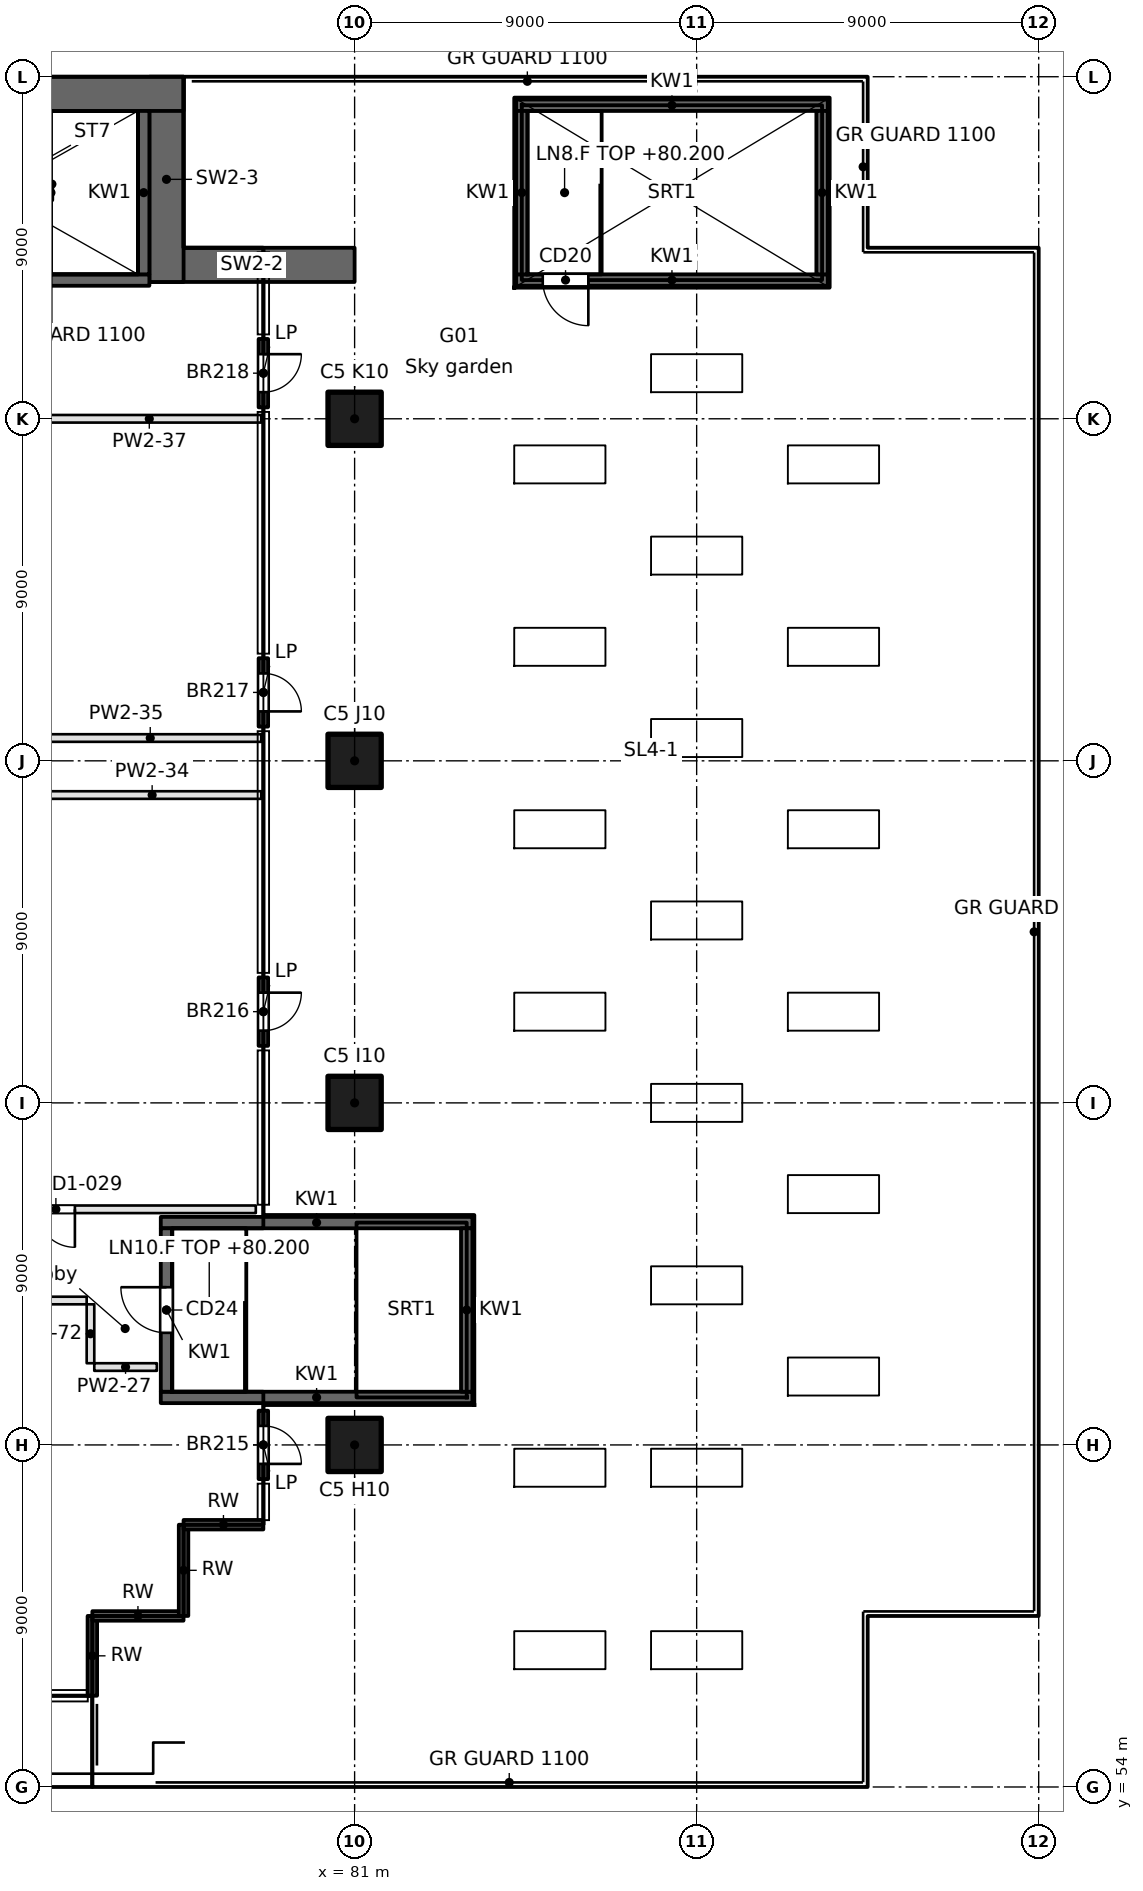
"""IFC4 building model, lengths in metres.
Left out: names, types, materials, properties, quantities, classifications, styles, units other than length and angle.
Written with IfcOpenShell. Run it as: python <this file> out.ifc"""

import sys

from ifc_helpers import new_model, si_unit, direction, frame, frame_2d, origin, origin_2d, place, context, subcontext, project, spatial, rectangle, extrude, element, fill, save


model = new_model("IFC4")
c1 = context("Model", 3, precision=1e-05, world=origin(), true_north=direction((0.0, 1.0)))
c2 = subcontext(c1, "Body", "Model", "MODEL_VIEW")
j1 = project(units=[si_unit("LENGTHUNIT", "METRE"), si_unit("PLANEANGLEUNIT", "RADIAN")], contexts=[c1])
p1 = place(None, origin())
s1 = spatial("IfcSite", under=j1, at=p1, CompositionType="ELEMENT")
p2 = place(p1, origin())
s2 = spatial("IfcBuilding", under=s1, at=p2, CompositionType="ELEMENT")
p3 = place(p2, frame((0.0, 0.0, 80.2)))
s3 = spatial("IfcBuildingStorey", under=s2, at=p3, CompositionType="ELEMENT", Elevation=80.2)
for number, where, z_axis, x_axis in (
    (1, (81.0, 63.0, 0.0), (0.0, 0.0, 1.0), (1.0, 0.0, 0.0)),
    (2, (81.0, 72.0, 0.0), (0.0, 0.0, 1.0), (1.0, 0.0, 0.0)),
    (3, (81.0, 81.0, 0.0), (0.0, 0.0, 1.0), (1.0, 0.0, 0.0)),
    (4, (81.0, 90.0, 0.0), (0.0, 0.0, 1.0), (1.0, 0.0, 0.0)),
):
    element("IfcColumn", number, at=place(p3, frame(where, z_axis=z_axis, x_axis=x_axis)), inside=s3, PredefinedType="COLUMN", context=c2, shape_type="SweptSolid", body=[
        extrude(rectangle(XDim=1.4, YDim=1.4, at=origin_2d()), origin(), (0.0, 0.0, 1.0), 4.6),
    ])
p4 = place(p3, frame((81.0, 94.05, 0.0), z_axis=(0.0, 0.0, 1.0), x_axis=(-1.0, 0.0, 0.0)))
e5 = element("IfcWall", 5, at=p4, inside=s3, PredefinedType="SHEAR", context=c2, shape_type="SweptSolid", body=[
    extrude(rectangle(XDim=5.4, YDim=0.9, at=frame_2d((2.7, 0.0))), origin(), (0.0, 0.0, 1.0), 4.6),
])
p5 = place(p3, frame((76.05, 93.6, 0.0), z_axis=(0.0, 0.0, 1.0), x_axis=(0.0, 1.0, 0.0)))
e6 = element("IfcWall", 6, at=p5, inside=s3, PredefinedType="SHEAR", context=c2, shape_type="SweptSolid", body=[
    extrude(rectangle(XDim=5.4, YDim=0.9, at=frame_2d((2.7, 0.0))), origin(), (0.0, 0.0, 1.0), 4.6),
])
p6 = place(p3, frame((76.5, 98.55, 0.0), z_axis=(0.0, 0.0, 1.0), x_axis=(-1.0, 0.0, 0.0)))
e7 = element("IfcWall", 7, at=p6, inside=s3, PredefinedType="SHEAR", context=c2, shape_type="SweptSolid", body=[
    extrude(rectangle(XDim=72.0, YDim=0.9, at=frame_2d((36.0, 0.0))), origin(), (0.0, 0.0, 1.0), 4.6),
])
p7 = place(p3, frame((74.099, 56.401, 0.0), z_axis=(0.0, 0.0, 1.0), x_axis=(0.00011626555, 0.999999993241, 0.0)))
e8 = element("IfcWall", 8, at=p7, inside=s3, PredefinedType="SOLIDWALL", context=c2, shape_type="SweptSolid", body=[
    extrude(rectangle(XDim=2.1, YDim=0.25, at=frame_2d((1.05, 0.0))), origin(), (0.0, 0.0, 1.0), 4.2),
])
for number, where, z_axis, x_axis in (
    (9, (74.099, 58.501, 0.0), (0.0, 0.0, 1.0), (1.0, 0.0, 0.0)),
    (10, (76.499, 58.501, 0.0), (0.0, 0.0, 1.0), (0.0, 1.0, 0.0)),
):
    element("IfcWall", number, at=place(p3, frame(where, z_axis=z_axis, x_axis=x_axis)), inside=s3, PredefinedType="SOLIDWALL", context=c2, shape_type="SweptSolid", body=[
        extrude(rectangle(XDim=2.4, YDim=0.25, at=frame_2d((1.2, 0.0))), origin(), (0.0, 0.0, 1.0), 4.2),
    ])
p8 = place(p3, frame((76.499, 60.901, 0.0), z_axis=(0.0, 0.0, 1.0), x_axis=(0.999999993241, 0.00011626555, 0.0)))
e11 = element("IfcWall", 11, at=p8, inside=s3, PredefinedType="SOLIDWALL", context=c2, shape_type="SweptSolid", body=[
    extrude(rectangle(XDim=2.1, YDim=0.25, at=frame_2d((1.05, 0.0))), origin(), (0.0, 0.0, 1.0), 4.2),
])
p9 = place(p3, frame((78.599, 62.101, 0.0), z_axis=(0.0, 0.0, 1.0), x_axis=(0.0, 1.0, 0.0)))
e12 = element("IfcWall", 12, at=p9, inside=s3, PredefinedType="SOLIDWALL", context=c2, shape_type="SweptSolid", body=[
    extrude(rectangle(XDim=1.8, YDim=0.25, at=frame_2d((0.9, 0.0))), origin(), (0.0, 0.0, 1.0), 4.2),
])
p10 = place(p9, frame((0.4, 0.0, 0.0)))
e13 = element("IfcOpeningElement", 13, at=p10, cuts=e12, PredefinedType="OPENING", context=c2, shape_type="SweptSolid", body=[
    extrude(rectangle(XDim=1.0, YDim=2.1, at=frame_2d((0.5, 1.05))), frame((0.0, 0.125, 0.0), z_axis=(0.0, -1.0, 0.0), x_axis=(1.0, 0.0, 0.0)), (0.0, 0.0, 1.0), 0.25),
])
p11 = place(p3, frame((78.599, 73.501, 0.0), z_axis=(0.0, 0.0, 1.0), x_axis=(0.0, 1.0, 0.0)))
e14 = element("IfcWall", 14, at=p11, inside=s3, PredefinedType="SOLIDWALL", context=c2, shape_type="SweptSolid", body=[
    extrude(rectangle(XDim=1.8, YDim=0.25, at=frame_2d((0.9, 0.0))), origin(), (0.0, 0.0, 1.0), 4.2),
])
p12 = place(p11, frame((0.4, 0.0, 0.0)))
e15 = element("IfcOpeningElement", 15, at=p12, cuts=e14, PredefinedType="OPENING", context=c2, shape_type="SweptSolid", body=[
    extrude(rectangle(XDim=1.0, YDim=2.1, at=frame_2d((0.5, 1.05))), frame((0.0, 0.125, 0.0), z_axis=(0.0, -1.0, 0.0), x_axis=(1.0, 0.0, 0.0)), (0.0, 0.0, 1.0), 0.25),
])
p13 = place(p3, frame((78.599, 81.9, 0.0), z_axis=(0.0, 0.0, 1.0), x_axis=(0.0, 1.0, 0.0)))
e16 = element("IfcWall", 16, at=p13, inside=s3, PredefinedType="SOLIDWALL", context=c2, shape_type="SweptSolid", body=[
    extrude(rectangle(XDim=1.8, YDim=0.25, at=frame_2d((0.9, 0.0))), origin(), (0.0, 0.0, 1.0), 4.2),
])
p14 = place(p13, frame((0.4, 0.0, 0.0)))
e17 = element("IfcOpeningElement", 17, at=p14, cuts=e16, PredefinedType="OPENING", context=c2, shape_type="SweptSolid", body=[
    extrude(rectangle(XDim=1.0, YDim=2.1, at=frame_2d((0.5, 1.05))), frame((0.0, 0.125, 0.0), z_axis=(0.0, -1.0, 0.0), x_axis=(1.0, 0.0, 0.0)), (0.0, 0.0, 1.0), 0.25),
])
p15 = place(p3, frame((78.599, 90.3, 0.0), z_axis=(0.0, 0.0, 1.0), x_axis=(0.0, 1.0, 0.0)))
e18 = element("IfcWall", 18, at=p15, inside=s3, PredefinedType="SOLIDWALL", context=c2, shape_type="SweptSolid", body=[
    extrude(rectangle(XDim=1.8, YDim=0.25, at=frame_2d((0.9, 0.0))), origin(), (0.0, 0.0, 1.0), 4.2),
])
p16 = place(p15, frame((0.4, 0.0, 0.0)))
e19 = element("IfcOpeningElement", 19, at=p16, cuts=e18, PredefinedType="OPENING", context=c2, shape_type="SweptSolid", body=[
    extrude(rectangle(XDim=1.0, YDim=2.1, at=frame_2d((0.5, 1.05))), frame((0.0, 0.125, 0.0), z_axis=(0.0, -1.0, 0.0), x_axis=(1.0, 0.0, 0.0)), (0.0, 0.0, 1.0), 0.25),
])
for number, where, z_axis, x_axis in (
    (20, (75.9, 64.25, -0.45), (0.0, 0.0, 1.0), (1.0, 0.0, 0.0)),
    (21, (75.9, 68.85, -0.45), (0.0, 0.0, 1.0), (1.0, 0.0, 0.0)),
):
    element("IfcWall", number, at=place(p3, frame(where, z_axis=z_axis, x_axis=x_axis)), inside=s3, PredefinedType="SOLIDWALL", context=c2, shape_type="SweptSolid", body=[
        extrude(rectangle(XDim=8.2, YDim=0.3, at=frame_2d((4.1, 0.0))), origin(), (0.0, 0.0, 1.0), 4.65),
    ])
p17 = place(p3, frame((67.4, 93.65, -0.45), z_axis=(0.0, 0.0, 1.0), x_axis=(1.0, 0.0, 0.0)))
e22 = element("IfcWall", 22, at=p17, inside=s3, PredefinedType="SOLIDWALL", context=c2, shape_type="SweptSolid", body=[
    extrude(rectangle(XDim=8.2, YDim=0.3, at=frame_2d((4.1, 0.0))), origin(), (0.0, 0.0, 1.0), 4.65),
])
p18 = place(p17, frame((0.7, 0.0, 0.45)))
e23 = element("IfcOpeningElement", 23, at=p18, cuts=e22, PredefinedType="OPENING", context=c2, shape_type="SweptSolid", body=[
    extrude(rectangle(XDim=1.2, YDim=2.1, at=frame_2d((0.6, 1.05))), frame((0.0, 0.15, 0.0), z_axis=(0.0, -1.0, 0.0), x_axis=(1.0, 0.0, 0.0)), (0.0, 0.0, 1.0), 0.3),
])
p19 = place(p3, frame((85.25, 93.65, -0.45), z_axis=(0.0, 0.0, 1.0), x_axis=(1.0, 0.0, 0.0)))
e24 = element("IfcWall", 24, at=p19, inside=s3, PredefinedType="SOLIDWALL", context=c2, shape_type="SweptSolid", body=[
    extrude(rectangle(XDim=8.2, YDim=0.3, at=frame_2d((4.1, 0.0))), origin(), (0.0, 0.0, 1.0), 4.65),
])
p20 = place(p19, frame((0.7, 0.0, 0.45)))
e25 = element("IfcOpeningElement", 25, at=p20, cuts=e24, PredefinedType="OPENING", context=c2, shape_type="SweptSolid", body=[
    extrude(rectangle(XDim=1.2, YDim=2.1, at=frame_2d((0.6, 1.05))), frame((0.0, 0.15, 0.0), z_axis=(0.0, -1.0, 0.0), x_axis=(1.0, 0.0, 0.0)), (0.0, 0.0, 1.0), 0.3),
])
p21 = place(p3, frame((85.25, 98.25, 0.0), z_axis=(0.0, 0.0, 1.0), x_axis=(1.0, 0.0, 0.0)))
e26 = element("IfcWall", 26, at=p21, inside=s3, PredefinedType="SOLIDWALL", context=c2, shape_type="SweptSolid", body=[
    extrude(rectangle(XDim=8.2, YDim=0.3, at=frame_2d((4.1, 0.0))), origin(), (0.0, 0.0, 1.0), 4.2),
])
p22 = place(p3, frame((75.45, 93.8, -0.45), z_axis=(0.0, 0.0, 1.0), x_axis=(0.0, 1.0, 0.0)))
e27 = element("IfcWall", 27, at=p22, inside=s3, PredefinedType="SOLIDWALL", context=c2, shape_type="SweptSolid", body=[
    extrude(rectangle(XDim=4.3, YDim=0.3, at=frame_2d((2.15, 0.0))), origin(), (0.0, 0.0, 1.0), 4.65),
])
p23 = place(p3, frame((76.05, 64.4, -0.45), z_axis=(0.0, 0.0, 1.0), x_axis=(0.0, 1.0, 0.0)))
e28 = element("IfcWall", 28, at=p23, inside=s3, PredefinedType="SOLIDWALL", context=c2, shape_type="SweptSolid", body=[
    extrude(rectangle(XDim=4.3, YDim=0.3, at=frame_2d((2.15, 0.0))), origin(), (0.0, 0.0, 1.0), 4.65),
])
p24 = place(p23, frame((1.55, 0.0, 0.45)))
e29 = element("IfcOpeningElement", 29, at=p24, cuts=e28, PredefinedType="OPENING", context=c2, shape_type="SweptSolid", body=[
    extrude(rectangle(XDim=1.2, YDim=2.1, at=frame_2d((0.6, 1.05))), frame((0.0, 0.15, 0.0), z_axis=(0.0, -1.0, 0.0), x_axis=(1.0, 0.0, 0.0)), (0.0, 0.0, 1.0), 0.3),
])
for number, where, z_axis, x_axis in (
    (30, (83.95, 64.4, -0.45), (0.0, 0.0, 1.0), (0.0, 1.0, 0.0)),
    (31, (85.4, 93.8, -0.45), (0.0, 0.0, 1.0), (0.0, 1.0, 0.0)),
    (32, (93.3, 93.8, -0.45), (0.0, 0.0, 1.0), (0.0, 1.0, 0.0)),
):
    element("IfcWall", number, at=place(p3, frame(where, z_axis=z_axis, x_axis=x_axis)), inside=s3, PredefinedType="SOLIDWALL", context=c2, shape_type="SweptSolid", body=[
        extrude(rectangle(XDim=4.3, YDim=0.3, at=frame_2d((2.15, 0.0))), origin(), (0.0, 0.0, 1.0), 4.65),
    ])
p25 = place(p3, frame((75.796, 65.05, 0.0), z_axis=(0.0, 0.0, 1.0), x_axis=(-1.0, 0.0, 0.0)))
e33 = element("IfcWall", 33, at=p25, inside=s3, PredefinedType="PARTITIONING", context=c2, shape_type="SweptSolid", body=[
    extrude(rectangle(XDim=1.646, YDim=0.2, at=frame_2d((0.823, 0.0))), origin(), (0.0, 0.0, 1.0), 4.2),
])
p26 = place(p3, frame((73.95, 66.8, 0.0), z_axis=(0.0, 0.0, 1.0), x_axis=(-1.0, 0.0, 0.0)))
e34 = element("IfcWall", 34, at=p26, inside=s3, PredefinedType="PARTITIONING", context=c2, shape_type="SweptSolid", body=[
    extrude(rectangle(XDim=34.85, YDim=0.2, at=frame_2d((17.425, 0.0))), origin(), (0.0, 0.0, 1.0), 4.2),
])
p27 = place(p26, frame((26.828, 0.0, 0.0)))
e35 = element("IfcOpeningElement", 35, at=p27, cuts=e34, PredefinedType="OPENING", context=c2, shape_type="SweptSolid", body=[
    extrude(rectangle(XDim=1.0, YDim=2.1, at=frame_2d((0.5, 1.05))), frame((0.0, 0.1, 0.0), z_axis=(0.0, -1.0, 0.0), x_axis=(1.0, 0.0, 0.0)), (0.0, 0.0, 1.0), 0.2),
])
p28 = place(p26, frame((24.328, 0.0, 0.0)))
e36 = element("IfcOpeningElement", 36, at=p28, cuts=e34, PredefinedType="OPENING", context=c2, shape_type="SweptSolid", body=[
    extrude(rectangle(XDim=1.0, YDim=2.1, at=frame_2d((0.5, 1.05))), frame((0.0, 0.1, 0.0), z_axis=(0.0, -1.0, 0.0), x_axis=(1.0, 0.0, 0.0)), (0.0, 0.0, 1.0), 0.2),
])
p29 = place(p26, frame((9.529, 0.0, 0.0)))
e37 = element("IfcOpeningElement", 37, at=p29, cuts=e34, PredefinedType="OPENING", context=c2, shape_type="SweptSolid", body=[
    extrude(rectangle(XDim=1.0, YDim=2.1, at=frame_2d((0.5, 1.05))), frame((0.0, 0.1, 0.0), z_axis=(0.0, -1.0, 0.0), x_axis=(1.0, 0.0, 0.0)), (0.0, 0.0, 1.0), 0.2),
])
p30 = place(p26, frame((7.029, 0.0, 0.0)))
e38 = element("IfcOpeningElement", 38, at=p30, cuts=e34, PredefinedType="OPENING", context=c2, shape_type="SweptSolid", body=[
    extrude(rectangle(XDim=1.0, YDim=2.1, at=frame_2d((0.5, 1.05))), frame((0.0, 0.1, 0.0), z_axis=(0.0, -1.0, 0.0), x_axis=(1.0, 0.0, 0.0)), (0.0, 0.0, 1.0), 0.2),
])
p31 = place(p3, frame((39.1, 69.2, 0.0), z_axis=(0.0, 0.0, 1.0), x_axis=(1.0, 0.0, 0.0)))
e39 = element("IfcWall", 39, at=p31, inside=s3, PredefinedType="PARTITIONING", context=c2, shape_type="SweptSolid", body=[
    extrude(rectangle(XDim=39.3, YDim=0.2, at=frame_2d((19.65, 0.0))), origin(), (0.0, 0.0, 1.0), 4.2),
])
p32 = place(p31, frame((7.01, 0.0, 0.0)))
e40 = element("IfcOpeningElement", 40, at=p32, cuts=e39, PredefinedType="OPENING", context=c2, shape_type="SweptSolid", body=[
    extrude(rectangle(XDim=1.0, YDim=2.1, at=frame_2d((0.5, 1.05))), frame((0.0, 0.1, 0.0), z_axis=(0.0, -1.0, 0.0), x_axis=(1.0, 0.0, 0.0)), (0.0, 0.0, 1.0), 0.2),
])
p33 = place(p31, frame((9.51, 0.0, 0.0)))
e41 = element("IfcOpeningElement", 41, at=p33, cuts=e39, PredefinedType="OPENING", context=c2, shape_type="SweptSolid", body=[
    extrude(rectangle(XDim=1.0, YDim=2.1, at=frame_2d((0.5, 1.05))), frame((0.0, 0.1, 0.0), z_axis=(0.0, -1.0, 0.0), x_axis=(1.0, 0.0, 0.0)), (0.0, 0.0, 1.0), 0.2),
])
p34 = place(p31, frame((18.9, 0.0, 0.0)))
e42 = element("IfcOpeningElement", 42, at=p34, cuts=e39, PredefinedType="OPENING", context=c2, shape_type="SweptSolid", body=[
    extrude(rectangle(XDim=1.0, YDim=2.1, at=frame_2d((0.5, 1.05))), frame((0.0, 0.1, 0.0), z_axis=(0.0, -1.0, 0.0), x_axis=(1.0, 0.0, 0.0)), (0.0, 0.0, 1.0), 0.2),
])
p35 = place(p31, frame((21.4, 0.0, 0.0)))
e43 = element("IfcOpeningElement", 43, at=p35, cuts=e39, PredefinedType="OPENING", context=c2, shape_type="SweptSolid", body=[
    extrude(rectangle(XDim=1.0, YDim=2.1, at=frame_2d((0.5, 1.05))), frame((0.0, 0.1, 0.0), z_axis=(0.0, -1.0, 0.0), x_axis=(1.0, 0.0, 0.0)), (0.0, 0.0, 1.0), 0.2),
])
p36 = place(p31, frame((31.04, 0.0, 0.0)))
e44 = element("IfcOpeningElement", 44, at=p36, cuts=e39, PredefinedType="OPENING", context=c2, shape_type="SweptSolid", body=[
    extrude(rectangle(XDim=1.0, YDim=2.1, at=frame_2d((0.5, 1.05))), frame((0.0, 0.1, 0.0), z_axis=(0.0, -1.0, 0.0), x_axis=(1.0, 0.0, 0.0)), (0.0, 0.0, 1.0), 0.2),
])
p37 = place(p31, frame((33.54, 0.0, 0.0)))
e45 = element("IfcOpeningElement", 45, at=p37, cuts=e39, PredefinedType="OPENING", context=c2, shape_type="SweptSolid", body=[
    extrude(rectangle(XDim=1.0, YDim=2.1, at=frame_2d((0.5, 1.05))), frame((0.0, 0.1, 0.0), z_axis=(0.0, -1.0, 0.0), x_axis=(1.0, 0.0, 0.0)), (0.0, 0.0, 1.0), 0.2),
])
p38 = place(p3, frame((72.8, 80.1, 0.0), z_axis=(0.0, 0.0, 1.0), x_axis=(1.0, 0.0, 0.0)))
e46 = element("IfcWall", 46, at=p38, inside=s3, PredefinedType="PARTITIONING", context=c2, shape_type="SweptSolid", body=[
    extrude(rectangle(XDim=5.745, YDim=0.2, at=frame_2d((2.873, 0.0))), origin(), (0.0, 0.0, 1.0), 4.2),
])
p39 = place(p3, frame((72.7, 81.6, 0.0), z_axis=(0.0, 0.0, 1.0), x_axis=(1.0, 0.0, 0.0)))
e47 = element("IfcWall", 47, at=p39, inside=s3, PredefinedType="PARTITIONING", context=c2, shape_type="SweptSolid", body=[
    extrude(rectangle(XDim=5.845, YDim=0.2, at=frame_2d((2.922, 0.0))), origin(), (0.0, 0.0, 1.0), 4.2),
])
p40 = place(p3, frame((78.545, 90.0, 0.0), z_axis=(0.0, 0.0, 1.0), x_axis=(-1.0, 0.0, 0.0)))
e48 = element("IfcWall", 48, at=p40, inside=s3, PredefinedType="PARTITIONING", context=c2, shape_type="SweptSolid", body=[
    extrude(rectangle(XDim=5.895, YDim=0.2, at=frame_2d((2.948, 0.0))), origin(), (0.0, 0.0, 1.0), 4.2),
])
p41 = place(p3, frame((74.05, 65.15, 0.0), z_axis=(0.0, 0.0, 1.0), x_axis=(0.0, 1.0, 0.0)))
e49 = element("IfcWall", 49, at=p41, inside=s3, PredefinedType="PARTITIONING", context=c2, shape_type="SweptSolid", body=[
    extrude(rectangle(XDim=1.55, YDim=0.2, at=frame_2d((0.775, 0.0))), origin(), (0.0, 0.0, 1.0), 4.2),
])
p42 = place(p10, frame((1.0, 0.0, 0.0), z_axis=(0.0, 0.0, 1.0), x_axis=(-1.0, 0.0, 0.0)))
e50 = element("IfcDoor", 50, at=p42, inside=s3, OperationType="SINGLE_SWING_RIGHT", PredefinedType="DOOR", context=c2, shape_type="SweptSolid", body=[
    extrude(rectangle(XDim=1.0, YDim=2.1, at=frame_2d((0.5, 1.05))), frame((0.0, 0.025, 0.0), z_axis=(0.0, -1.0, 0.0), x_axis=(1.0, 0.0, 0.0)), (0.0, 0.0, 1.0), 0.05),
])
fill(e13, e50)
p43 = place(p12, frame((1.0, 0.0, 0.0), z_axis=(0.0, 0.0, 1.0), x_axis=(-1.0, 0.0, 0.0)))
e51 = element("IfcDoor", 51, at=p43, inside=s3, OperationType="SINGLE_SWING_LEFT", PredefinedType="DOOR", context=c2, shape_type="SweptSolid", body=[
    extrude(rectangle(XDim=1.0, YDim=2.1, at=frame_2d((0.5, 1.05))), frame((0.0, 0.025, 0.0), z_axis=(0.0, -1.0, 0.0), x_axis=(1.0, 0.0, 0.0)), (0.0, 0.0, 1.0), 0.05),
])
fill(e15, e51)
p44 = place(p14, frame((1.0, 0.0, 0.0), z_axis=(0.0, 0.0, 1.0), x_axis=(-1.0, 0.0, 0.0)))
e52 = element("IfcDoor", 52, at=p44, inside=s3, OperationType="SINGLE_SWING_RIGHT", PredefinedType="DOOR", context=c2, shape_type="SweptSolid", body=[
    extrude(rectangle(XDim=1.0, YDim=2.1, at=frame_2d((0.5, 1.05))), frame((0.0, 0.025, 0.0), z_axis=(0.0, -1.0, 0.0), x_axis=(1.0, 0.0, 0.0)), (0.0, 0.0, 1.0), 0.05),
])
fill(e17, e52)
p45 = place(p16, frame((1.0, 0.0, 0.0), z_axis=(0.0, 0.0, 1.0), x_axis=(-1.0, 0.0, 0.0)))
e53 = element("IfcDoor", 53, at=p45, inside=s3, OperationType="SINGLE_SWING_LEFT", PredefinedType="DOOR", context=c2, shape_type="SweptSolid", body=[
    extrude(rectangle(XDim=1.0, YDim=2.1, at=frame_2d((0.5, 1.05))), frame((0.0, 0.025, 0.0), z_axis=(0.0, -1.0, 0.0), x_axis=(1.0, 0.0, 0.0)), (0.0, 0.0, 1.0), 0.05),
])
fill(e19, e53)
p46 = place(p20, frame((1.2, 0.0, 0.0), z_axis=(0.0, 0.0, 1.0), x_axis=(-1.0, 0.0, 0.0)))
e54 = element("IfcDoor", 54, at=p46, inside=s3, OperationType="SINGLE_SWING_LEFT", PredefinedType="DOOR", context=c2, shape_type="SweptSolid", body=[
    extrude(rectangle(XDim=1.2, YDim=2.1, at=frame_2d((0.6, 1.05))), frame((0.0, 0.025, 0.0), z_axis=(0.0, -1.0, 0.0), x_axis=(1.0, 0.0, 0.0)), (0.0, 0.0, 1.0), 0.05),
])
fill(e25, e54)
p47 = place(p24, origin())
e55 = element("IfcDoor", 55, at=p47, inside=s3, OperationType="SINGLE_SWING_RIGHT", PredefinedType="DOOR", context=c2, shape_type="SweptSolid", body=[
    extrude(rectangle(XDim=1.2, YDim=2.1, at=frame_2d((0.6, 1.05))), frame((0.0, 0.025, 0.0), z_axis=(0.0, -1.0, 0.0), x_axis=(1.0, 0.0, 0.0)), (0.0, 0.0, 1.0), 0.05),
])
fill(e29, e55)
p48 = place(p37, frame((1.0, 0.0, 0.0), z_axis=(0.0, 0.0, 1.0), x_axis=(-1.0, 0.0, 0.0)))
e56 = element("IfcDoor", 56, at=p48, inside=s3, OperationType="SINGLE_SWING_LEFT", PredefinedType="DOOR", context=c2, shape_type="SweptSolid", body=[
    extrude(rectangle(XDim=1.0, YDim=2.1, at=frame_2d((0.5, 1.05))), frame((0.0, 0.025, 0.0), z_axis=(0.0, -1.0, 0.0), x_axis=(1.0, 0.0, 0.0)), (0.0, 0.0, 1.0), 0.05),
])
fill(e45, e56)
save(model, sys.argv[1])
